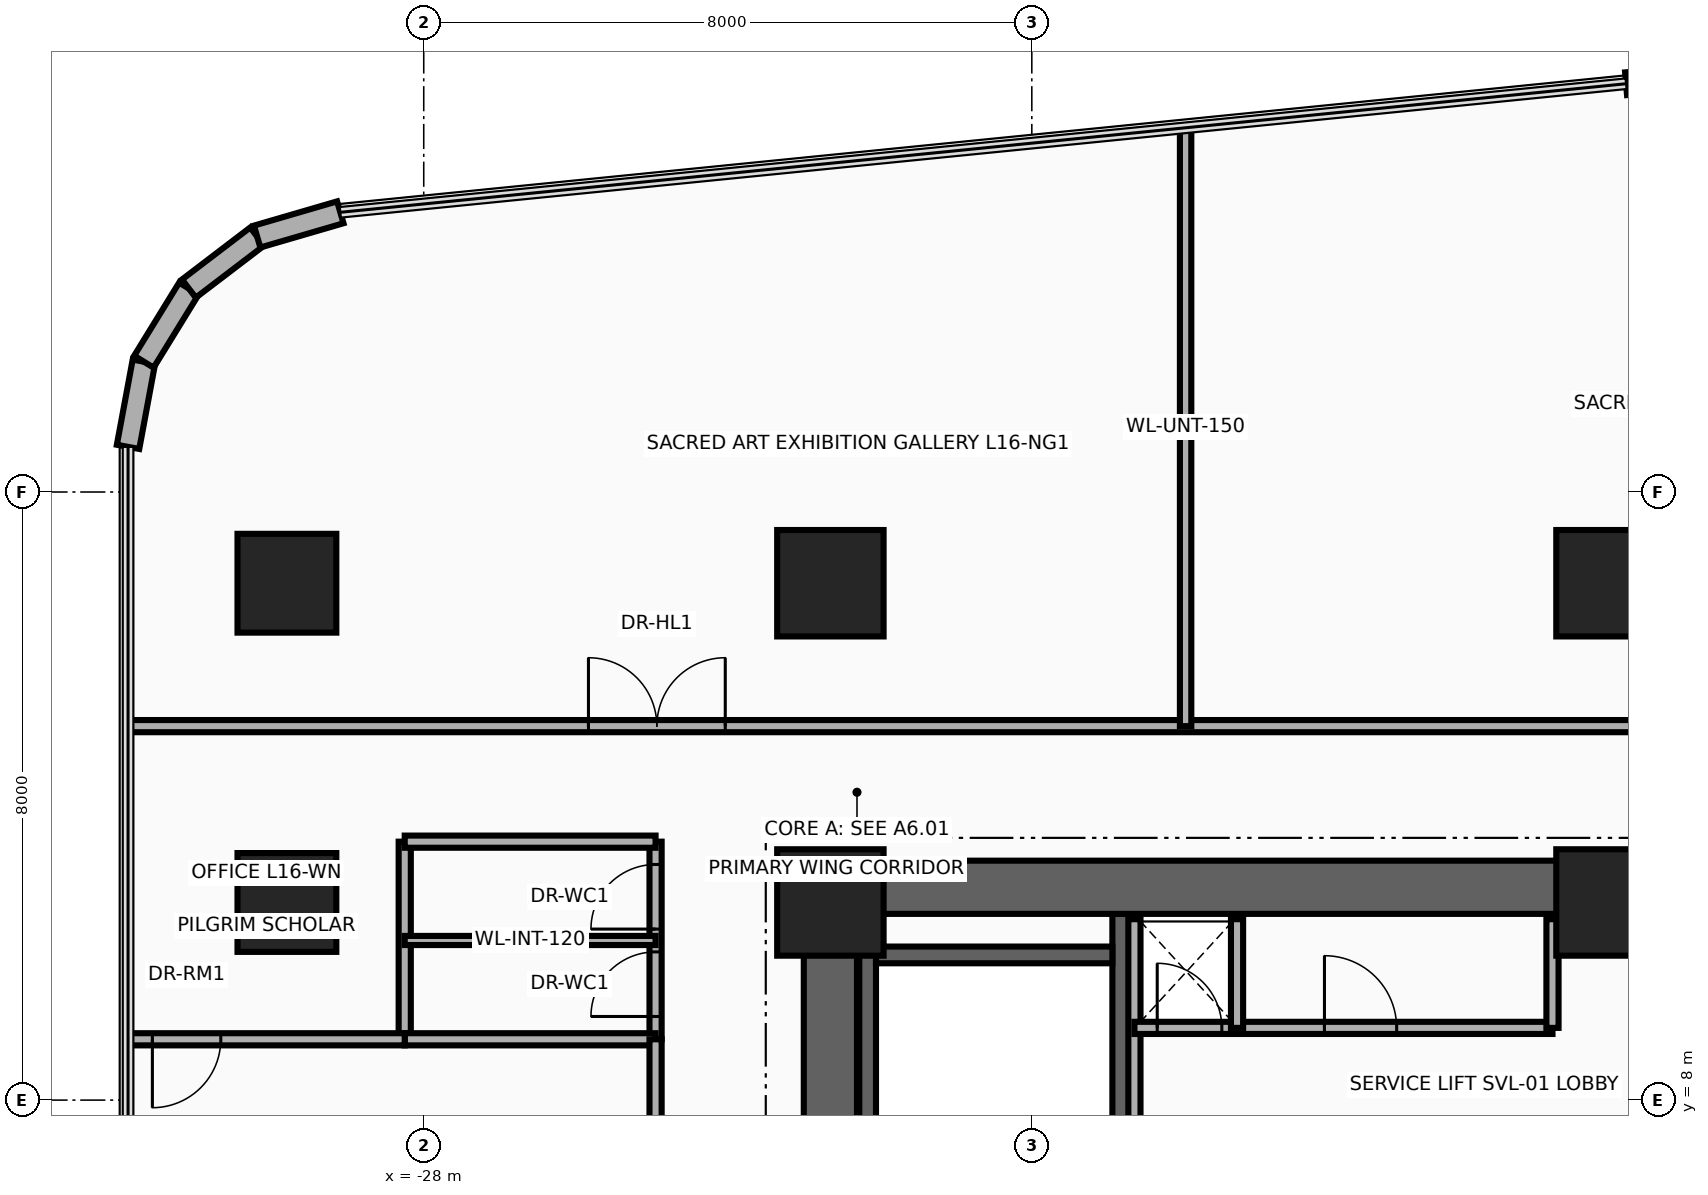
"""IFC4 building model, lengths in metres.
Left out: names, types, materials, properties, quantities, classifications, styles, units other than length and angle.
Written with IfcOpenShell. Run it as: python <this file> out.ifc"""

import sys

from ifc_helpers import new_model, si_unit, direction, frame, frame_2d, origin, origin_2d, place, context, subcontext, project, spatial, rectangle, circle, extrude, source, transform, mapped, element, fill, save


model = new_model("IFC4")
c1 = context("Model", 3, precision=1e-05, world=origin(), true_north=direction((0.0, 1.0)))
c2 = subcontext(c1, "Body", "Model", "MODEL_VIEW")
j1 = project(units=[si_unit("LENGTHUNIT", "METRE"), si_unit("PLANEANGLEUNIT", "RADIAN")], contexts=[c1])
p1 = place(None, origin())
s1 = spatial("IfcSite", under=j1, at=p1, CompositionType="ELEMENT")
p2 = place(p1, origin())
s2 = spatial("IfcBuilding", under=s1, at=p2, CompositionType="ELEMENT")
p3 = place(p2, frame((0.0, 0.0, 66.7)))
s3 = spatial("IfcBuildingStorey", under=s2, at=p3, CompositionType="ELEMENT", Elevation=66.7)
for number, where, z_axis, x_axis in (
    (1, (-22.16, 1.78, 0.0), (0.0, 0.0, 1.0), (0.0, 1.0, 0.0)),
    (2, (-18.83, 1.78, 0.0), (0.0, 0.0, 1.0), (0.0, 1.0, 0.0)),
):
    element("IfcWall", number, at=place(p3, frame(where, z_axis=z_axis, x_axis=x_axis)), inside=s3, PredefinedType="SHEAR", context=c2, shape_type="SweptSolid", body=[
        extrude(rectangle(XDim=8.67, YDim=0.22, at=frame_2d((4.335, 0.0))), origin(), (0.0, 0.0, 1.0), 3.46),
    ])
p4 = place(p3, frame((-22.05, 9.91, 0.0), z_axis=(0.0, 0.0, 1.0), x_axis=(1.0, 0.0, 0.0)))
e3 = element("IfcWall", 3, at=p4, inside=s3, PredefinedType="SHEAR", context=c2, shape_type="SweptSolid", body=[
    extrude(rectangle(XDim=3.11, YDim=0.22, at=frame_2d((1.555, 0.0))), origin(), (0.0, 0.0, 1.0), 3.46),
])
p5 = place(p3, frame((-22.65, -11.15, 0.0), z_axis=(0.0, 0.0, 1.0), x_axis=(0.0, 1.0, 0.0)))
e4 = element("IfcWall", 4, at=p5, inside=s3, PredefinedType="SHEAR", context=c2, shape_type="SweptSolid", body=[
    extrude(rectangle(XDim=22.3, YDim=0.7, at=frame_2d((11.15, 0.0))), origin(), (0.0, 0.0, 1.0), 3.46),
])
p6 = place(p3, frame((-22.65, 10.8, 0.0), z_axis=(0.0, 0.0, 1.0), x_axis=(1.0, 0.0, 0.0)))
e5 = element("IfcWall", 5, at=p6, inside=s3, PredefinedType="SHEAR", context=c2, shape_type="SweptSolid", body=[
    extrude(rectangle(XDim=10.25, YDim=0.7, at=frame_2d((5.125, 0.0))), origin(), (0.0, 0.0, 1.0), 3.46),
])
m1 = source(origin(), c2, "Body", "SweptSolid", [
    extrude(circle(Radius=0.65, at=origin_2d()), origin(), (0.0, 0.0, 1.0), 3.7),
])
p7 = place(p3, frame((-29.8, 10.6, 0.0), z_axis=(0.0, 0.0, 1.0), x_axis=(1.0, 0.0, 0.0)))
e6 = element("IfcColumn", 6, at=p7, inside=s3, PredefinedType="COLUMN", context=c2, shape_type="MappedRepresentation", body=[
    mapped(m1, transform((0.0, 0.0, 0.0), x_axis=(1.0, 0.0, 0.0), y_axis=(0.0, 1.0, 0.0), z_axis=(0.0, 0.0, 1.0), scale=1.0)),
])
m2 = source(origin(), c2, "Body", "SweptSolid", [
    extrude(rectangle(XDim=1.4, YDim=1.4, at=origin_2d()), origin(), (0.0, 0.0, 1.0), 3.7),
])
for number, where, z_axis, x_axis in (
    (7, (-22.65, 10.6, 0.0), (0.0, 0.0, 1.0), (1.0, 0.0, 0.0)),
    (8, (-12.4, 10.6, 0.0), (0.0, 0.0, 1.0), (1.0, 0.0, 0.0)),
):
    element("IfcColumn", number, at=place(p3, frame(where, z_axis=z_axis, x_axis=x_axis)), inside=s3, PredefinedType="COLUMN", context=c2, shape_type="MappedRepresentation", body=[
        mapped(m2, transform((0.0, 0.0, 0.0), x_axis=(1.0, 0.0, 0.0), y_axis=(0.0, 1.0, 0.0), z_axis=(0.0, 0.0, 1.0), scale=1.0)),
    ])
p8 = place(p3, frame((-29.8, 14.8, 0.0), z_axis=(0.0, 0.0, 1.0), x_axis=(1.0, 0.0, 0.0)))
e9 = element("IfcColumn", 9, at=p8, inside=s3, PredefinedType="COLUMN", context=c2, shape_type="MappedRepresentation", body=[
    mapped(m1, transform((0.0, 0.0, 0.0), x_axis=(1.0, 0.0, 0.0), y_axis=(0.0, 1.0, 0.0), z_axis=(0.0, 0.0, 1.0), scale=1.0)),
])
for number, where, z_axis, x_axis in (
    (10, (-22.65, 14.8, 0.0), (0.0, 0.0, 1.0), (1.0, 0.0, 0.0)),
    (11, (-12.4, 14.8, 0.0), (0.0, 0.0, 1.0), (1.0, 0.0, 0.0)),
):
    element("IfcColumn", number, at=place(p3, frame(where, z_axis=z_axis, x_axis=x_axis)), inside=s3, PredefinedType="COLUMN", context=c2, shape_type="MappedRepresentation", body=[
        mapped(m2, transform((0.0, 0.0, 0.0), x_axis=(1.0, 0.0, 0.0), y_axis=(0.0, 1.0, 0.0), z_axis=(0.0, 0.0, 1.0), scale=1.0)),
    ])
p9 = place(p3, frame((-31.89, 16.594, 0.0), z_axis=(0.0, 0.0, 1.0), x_axis=(0.182748995683, 0.9831596028, 0.0)))
e12 = element("IfcWall", 12, at=p9, inside=s3, PredefinedType="SOLIDWALL", context=c2, shape_type="SweptSolid", body=[
    extrude(rectangle(XDim=1.14, YDim=0.3, at=frame_2d((0.57, 0.0))), origin(), (0.0, 0.0, 1.0), 3.46),
])
p10 = place(p3, frame((-31.682, 17.714, 0.0), z_axis=(0.0, 0.0, 1.0), x_axis=(0.524157723014, 0.8516212077, 0.0)))
e13 = element("IfcWall", 13, at=p10, inside=s3, PredefinedType="SOLIDWALL", context=c2, shape_type="SweptSolid", body=[
    extrude(rectangle(XDim=1.129, YDim=0.3, at=frame_2d((0.565, 0.0))), origin(), (0.0, 0.0, 1.0), 3.46),
])
p11 = place(p3, frame((-31.09, 18.676, 0.0), z_axis=(0.0, 0.0, 1.0), x_axis=(0.795253002434, 0.606277710393, 0.0)))
e14 = element("IfcWall", 14, at=p11, inside=s3, PredefinedType="SOLIDWALL", context=c2, shape_type="SweptSolid", body=[
    extrude(rectangle(XDim=1.129, YDim=0.3, at=frame_2d((0.564, 0.0))), origin(), (0.0, 0.0, 1.0), 3.46),
])
p12 = place(p3, frame((-30.192, 19.361, 0.0), z_axis=(0.0, 0.0, 1.0), x_axis=(0.960071941549, 0.279753225271, 0.0)))
e15 = element("IfcWall", 15, at=p12, inside=s3, PredefinedType="SOLIDWALL", context=c2, shape_type="SweptSolid", body=[
    extrude(rectangle(XDim=1.14, YDim=0.3, at=frame_2d((0.57, 0.0))), origin(), (0.0, 0.0, 1.0), 3.46),
])
p13 = place(p3, frame((-12.182, 21.371, 0.0), z_axis=(0.0, 0.0, 1.0), x_axis=(0.996527790842, 0.08326080759, 0.0)))
e16 = element("IfcWall", 16, at=p13, inside=s3, PredefinedType="SOLIDWALL", context=c2, shape_type="SweptSolid", body=[
    extrude(rectangle(XDim=0.094, YDim=0.3, at=frame_2d((0.047, 0.0))), origin(), (0.0, 0.0, 1.0), 3.46),
])
p14 = place(p3, frame((-18.65, 7.45, 0.0), z_axis=(0.0, 0.0, 1.0), x_axis=(0.0, 1.0, 0.0)))
e17 = element("IfcWall", 17, at=p14, inside=s3, PredefinedType="PARTITIONING", context=c2, shape_type="SweptSolid", body=[
    extrude(rectangle(XDim=2.93, YDim=0.16, at=frame_2d((1.465, 0.0))), origin(), (0.0, 0.0, 1.0), 3.46),
])
p15 = place(p3, frame((-18.65, 8.95, 0.0), z_axis=(0.0, 0.0, 1.0), x_axis=(1.0, 0.0, 0.0)))
e18 = element("IfcWall", 18, at=p15, inside=s3, PredefinedType="PARTITIONING", context=c2, shape_type="SweptSolid", body=[
    extrude(rectangle(XDim=5.5, YDim=0.16, at=frame_2d((2.75, 0.0))), origin(), (0.0, 0.0, 1.0), 3.46),
])
p16 = place(p15, frame((0.3, 0.0, 0.0)))
e19 = element("IfcOpeningElement", 19, at=p16, cuts=e18, PredefinedType="OPENING", context=c2, shape_type="SweptSolid", body=[
    extrude(rectangle(XDim=0.85, YDim=2.05, at=frame_2d((0.425, 1.025))), frame((0.0, 0.095, 0.0), z_axis=(0.0, -1.0, 0.0), x_axis=(1.0, 0.0, 0.0)), (0.0, 0.0, 1.0), 0.19),
])
p17 = place(p15, frame((2.5, 0.0, 0.0)))
e20 = element("IfcOpeningElement", 20, at=p17, cuts=e18, PredefinedType="OPENING", context=c2, shape_type="SweptSolid", body=[
    extrude(rectangle(XDim=0.95, YDim=2.15, at=frame_2d((0.475, 1.075))), frame((0.0, 0.095, 0.0), z_axis=(0.0, -1.0, 0.0), x_axis=(1.0, 0.0, 0.0)), (0.0, 0.0, 1.0), 0.19),
])
for number, where, z_axis, x_axis in (
    (21, (-13.15, 8.95, 0.0), (0.0, 0.0, 1.0), (0.0, 1.0, 0.0)),
    (22, (-17.3, 8.95, 0.0), (0.0, 0.0, 1.0), (0.0, 1.0, 0.0)),
):
    element("IfcWall", number, at=place(p3, frame(where, z_axis=z_axis, x_axis=x_axis)), inside=s3, PredefinedType="PARTITIONING", context=c2, shape_type="SweptSolid", body=[
        extrude(rectangle(XDim=1.43, YDim=0.16, at=frame_2d((0.715, 0.0))), origin(), (0.0, 0.0, 1.0), 3.46),
    ])
p18 = place(p3, frame((-28.25, 8.8, 0.0), z_axis=(0.0, 0.0, 1.0), x_axis=(0.0, 1.0, 0.0)))
e23 = element("IfcWall", 23, at=p18, inside=s3, PredefinedType="PARTITIONING", context=c2, shape_type="SweptSolid", body=[
    extrude(rectangle(XDim=2.6, YDim=0.16, at=frame_2d((1.3, 0.0))), origin(), (0.0, 0.0, 1.0), 2.583),
])
p19 = place(p3, frame((-24.95, 8.8, 0.0), z_axis=(0.0, 0.0, 1.0), x_axis=(0.0, 1.0, 0.0)))
e24 = element("IfcWall", 24, at=p19, inside=s3, PredefinedType="PARTITIONING", context=c2, shape_type="SweptSolid", body=[
    extrude(rectangle(XDim=2.6, YDim=0.16, at=frame_2d((1.3, 0.0))), origin(), (0.0, 0.0, 1.0), 2.583),
])
p20 = place(p19, frame((0.3, 0.0, 0.0)))
e25 = element("IfcOpeningElement", 25, at=p20, cuts=e24, PredefinedType="OPENING", context=c2, shape_type="SweptSolid", body=[
    extrude(rectangle(XDim=0.85, YDim=2.1, at=frame_2d((0.425, 1.05))), frame((0.0, 0.095, 0.0), z_axis=(0.0, -1.0, 0.0), x_axis=(1.0, 0.0, 0.0)), (0.0, 0.0, 1.0), 0.19),
])
p21 = place(p19, frame((1.45, 0.0, 0.0)))
e26 = element("IfcOpeningElement", 26, at=p21, cuts=e24, PredefinedType="OPENING", context=c2, shape_type="SweptSolid", body=[
    extrude(rectangle(XDim=0.85, YDim=2.1, at=frame_2d((0.425, 1.05))), frame((0.0, 0.095, 0.0), z_axis=(0.0, -1.0, 0.0), x_axis=(1.0, 0.0, 0.0)), (0.0, 0.0, 1.0), 0.19),
])
for number, where, z_axis, x_axis in (
    (27, (-28.25, 8.8, 0.0), (0.0, 0.0, 1.0), (1.0, 0.0, 0.0)),
    (28, (-28.25, 11.4, 0.0), (0.0, 0.0, 1.0), (1.0, 0.0, 0.0)),
):
    element("IfcWall", number, at=place(p3, frame(where, z_axis=z_axis, x_axis=x_axis)), inside=s3, PredefinedType="PARTITIONING", context=c2, shape_type="SweptSolid", body=[
        extrude(rectangle(XDim=3.3, YDim=0.16, at=frame_2d((1.65, 0.0))), origin(), (0.0, 0.0, 1.0), 3.46),
    ])
p22 = place(p3, frame((-28.25, 10.1, 0.0), z_axis=(0.0, 0.0, 1.0), x_axis=(1.0, 0.0, 0.0)))
e29 = element("IfcWall", 29, at=p22, inside=s3, PredefinedType="PARTITIONING", context=c2, shape_type="SweptSolid", body=[
    extrude(rectangle(XDim=3.3, YDim=0.12, at=frame_2d((1.65, 0.0))), origin(), (0.0, 0.0, 1.0), 3.46),
])
p23 = place(p3, frame((-24.95, -11.42, 0.0), z_axis=(0.0, 0.0, 1.0), x_axis=(0.0, 1.0, 0.0)))
e30 = element("IfcWall", 30, at=p23, inside=s3, PredefinedType="PARTITIONING", context=c2, shape_type="SweptSolid", body=[
    extrude(rectangle(XDim=20.22, YDim=0.16, at=frame_2d((10.11, 0.0))), origin(), (0.0, 0.0, 1.0), 2.583),
])
p24 = place(p23, frame((4.155, 0.0, 0.0)))
e31 = element("IfcOpeningElement", 31, at=p24, cuts=e30, PredefinedType="OPENING", context=c2, shape_type="SweptSolid", body=[
    extrude(rectangle(XDim=1.8, YDim=2.15, at=frame_2d((0.9, 1.075))), frame((0.0, 0.095, 0.0), z_axis=(0.0, -1.0, 0.0), x_axis=(1.0, 0.0, 0.0)), (0.0, 0.0, 1.0), 0.19),
])
p25 = place(p23, frame((14.265, 0.0, 0.0)))
e32 = element("IfcOpeningElement", 32, at=p25, cuts=e30, PredefinedType="OPENING", context=c2, shape_type="SweptSolid", body=[
    extrude(rectangle(XDim=1.8, YDim=2.15, at=frame_2d((0.9, 1.075))), frame((0.0, 0.095, 0.0), z_axis=(0.0, -1.0, 0.0), x_axis=(1.0, 0.0, 0.0)), (0.0, 0.0, 1.0), 0.19),
])
p26 = place(p3, frame((-31.89, 8.8, 0.0), z_axis=(0.0, 0.0, 1.0), x_axis=(1.0, 0.0, 0.0)))
e33 = element("IfcWall", 33, at=p26, inside=s3, PredefinedType="PARTITIONING", context=c2, shape_type="SweptSolid", body=[
    extrude(rectangle(XDim=3.64, YDim=0.16, at=frame_2d((1.82, 0.0))), origin(), (0.0, 0.0, 1.0), 2.896),
])
p27 = place(p26, frame((0.32, 0.0, 0.0)))
e34 = element("IfcOpeningElement", 34, at=p27, cuts=e33, PredefinedType="OPENING", context=c2, shape_type="SweptSolid", body=[
    extrude(rectangle(XDim=0.9, YDim=2.1, at=frame_2d((0.45, 1.05))), frame((0.0, 0.095, 0.0), z_axis=(0.0, -1.0, 0.0), x_axis=(1.0, 0.0, 0.0)), (0.0, 0.0, 1.0), 0.19),
])
p28 = place(p3, frame((-31.89, 12.92, 0.0), z_axis=(0.0, 0.0, 1.0), x_axis=(1.0, 0.0, 0.0)))
e35 = element("IfcWall", 35, at=p28, inside=s3, PredefinedType="PARTITIONING", context=c2, shape_type="SweptSolid", body=[
    extrude(rectangle(XDim=45.44, YDim=0.16, at=frame_2d((22.72, 0.0))), origin(), (0.0, 0.0, 1.0), 2.583),
])
p29 = place(p28, frame((6.057, 0.0, 0.0)))
e36 = element("IfcOpeningElement", 36, at=p29, cuts=e35, PredefinedType="OPENING", context=c2, shape_type="SweptSolid", body=[
    extrude(rectangle(XDim=1.8, YDim=2.15, at=frame_2d((0.9, 1.075))), frame((0.0, 0.095, 0.0), z_axis=(0.0, -1.0, 0.0), x_axis=(1.0, 0.0, 0.0)), (0.0, 0.0, 1.0), 0.19),
])
p30 = place(p28, frame((20.895, 0.0, 0.0)))
e37 = element("IfcOpeningElement", 37, at=p30, cuts=e35, PredefinedType="OPENING", context=c2, shape_type="SweptSolid", body=[
    extrude(rectangle(XDim=1.8, YDim=2.15, at=frame_2d((0.9, 1.075))), frame((0.0, 0.095, 0.0), z_axis=(0.0, -1.0, 0.0), x_axis=(1.0, 0.0, 0.0)), (0.0, 0.0, 1.0), 0.19),
])
p31 = place(p28, frame((36.658, 0.0, 0.0)))
e38 = element("IfcOpeningElement", 38, at=p31, cuts=e35, PredefinedType="OPENING", context=c2, shape_type="SweptSolid", body=[
    extrude(rectangle(XDim=1.8, YDim=2.15, at=frame_2d((0.9, 1.075))), frame((0.0, 0.095, 0.0), z_axis=(0.0, -1.0, 0.0), x_axis=(1.0, 0.0, 0.0)), (0.0, 0.0, 1.0), 0.19),
])
p32 = place(p3, frame((-17.977, 12.92, 0.0), z_axis=(0.0, 0.0, 1.0), x_axis=(0.0, 1.0, 0.0)))
e39 = element("IfcWall", 39, at=p32, inside=s3, PredefinedType="PARTITIONING", context=c2, shape_type="SweptSolid", body=[
    extrude(rectangle(XDim=7.872, YDim=0.15, at=frame_2d((3.936, 0.0))), origin(), (0.0, 0.0, 1.0), 2.583),
])
p33 = place(p16, origin())
e40 = element("IfcDoor", 40, at=p33, inside=s3, OperationType="SINGLE_SWING_LEFT", PredefinedType="DOOR", context=c2, shape_type="SweptSolid", body=[
    extrude(rectangle(XDim=0.85, YDim=2.05, at=frame_2d((0.425, 1.025))), frame((0.0, 0.025, 0.0), z_axis=(0.0, -1.0, 0.0), x_axis=(1.0, 0.0, 0.0)), (0.0, 0.0, 1.0), 0.05),
])
fill(e19, e40)
p34 = place(p17, origin())
e41 = element("IfcDoor", 41, at=p34, inside=s3, OperationType="SINGLE_SWING_RIGHT", PredefinedType="DOOR", context=c2, shape_type="SweptSolid", body=[
    extrude(rectangle(XDim=0.95, YDim=2.15, at=frame_2d((0.475, 1.075))), frame((0.0, 0.025, 0.0), z_axis=(0.0, -1.0, 0.0), x_axis=(1.0, 0.0, 0.0)), (0.0, 0.0, 1.0), 0.05),
])
fill(e20, e41)
p35 = place(p20, origin())
e42 = element("IfcDoor", 42, at=p35, inside=s3, OperationType="SINGLE_SWING_LEFT", PredefinedType="DOOR", context=c2, shape_type="SweptSolid", body=[
    extrude(rectangle(XDim=0.85, YDim=2.1, at=frame_2d((0.425, 1.05))), frame((0.0, 0.025, 0.0), z_axis=(0.0, -1.0, 0.0), x_axis=(1.0, 0.0, 0.0)), (0.0, 0.0, 1.0), 0.05),
])
fill(e25, e42)
p36 = place(p21, origin())
e43 = element("IfcDoor", 43, at=p36, inside=s3, OperationType="SINGLE_SWING_RIGHT", PredefinedType="DOOR", context=c2, shape_type="SweptSolid", body=[
    extrude(rectangle(XDim=0.85, YDim=2.1, at=frame_2d((0.425, 1.05))), frame((0.0, 0.025, 0.0), z_axis=(0.0, -1.0, 0.0), x_axis=(1.0, 0.0, 0.0)), (0.0, 0.0, 1.0), 0.05),
])
fill(e26, e43)
p37 = place(p27, frame((0.9, 0.0, 0.0), z_axis=(0.0, 0.0, 1.0), x_axis=(-1.0, 0.0, 0.0)))
e44 = element("IfcDoor", 44, at=p37, inside=s3, OperationType="SINGLE_SWING_LEFT", PredefinedType="DOOR", context=c2, shape_type="SweptSolid", body=[
    extrude(rectangle(XDim=0.9, YDim=2.1, at=frame_2d((0.45, 1.05))), frame((0.0, 0.025, 0.0), z_axis=(0.0, -1.0, 0.0), x_axis=(1.0, 0.0, 0.0)), (0.0, 0.0, 1.0), 0.05),
])
fill(e34, e44)
p38 = place(p29, origin())
e45 = element("IfcDoor", 45, at=p38, inside=s3, OperationType="DOUBLE_DOOR_SINGLE_SWING", PredefinedType="DOOR", context=c2, shape_type="SweptSolid", body=[
    extrude(rectangle(XDim=1.8, YDim=2.15, at=frame_2d((0.9, 1.075))), frame((0.0, 0.025, 0.0), z_axis=(0.0, -1.0, 0.0), x_axis=(1.0, 0.0, 0.0)), (0.0, 0.0, 1.0), 0.05),
])
fill(e36, e45)
save(model, sys.argv[1])
